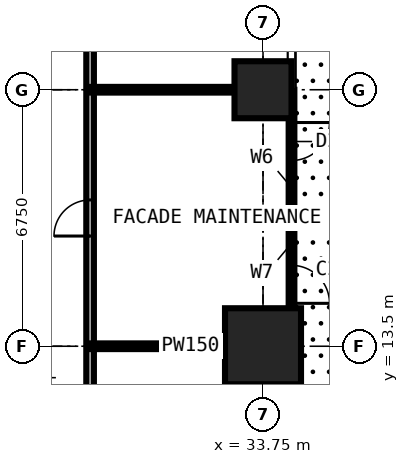
"""IFC4 building model, lengths in metres.
Left out: names, types, materials, properties, quantities, classifications, styles, units other than length and angle.
Written with IfcOpenShell. Run it as: python <this file> out.ifc"""

import sys

from ifc_helpers import new_model, si_unit, direction, frame, frame_2d, origin, origin_2d, place, context, subcontext, project, spatial, rectangle, extrude, element, fill, save


model = new_model("IFC4")
c1 = context("Model", 3, precision=1e-05, world=origin(), true_north=direction((0.0, 1.0)))
c2 = subcontext(c1, "Body", "Model", "MODEL_VIEW")
j1 = project(units=[si_unit("LENGTHUNIT", "METRE"), si_unit("PLANEANGLEUNIT", "RADIAN")], contexts=[c1])
p1 = place(None, origin())
s1 = spatial("IfcSite", under=j1, at=p1, CompositionType="ELEMENT")
p2 = place(p1, origin())
s2 = spatial("IfcBuilding", under=s1, at=p2, CompositionType="ELEMENT")
p3 = place(p2, frame((0.0, 0.0, 142.2)))
s3 = spatial("IfcBuildingStorey", under=s2, at=p3, CompositionType="ELEMENT", Elevation=142.2)
p4 = place(p3, frame((33.75, 13.5, 0.0), z_axis=(0.0, 0.0, 1.0), x_axis=(1.0, 0.0, 0.0)))
e1 = element("IfcColumn", 1, at=p4, inside=s3, PredefinedType="COLUMN", context=c2, shape_type="SweptSolid", body=[
    extrude(rectangle(XDim=2.0, YDim=2.0, at=origin_2d()), origin(), (0.0, 0.0, 1.0), 3.6),
])
p5 = place(p3, frame((33.75, 20.25, 0.0), z_axis=(0.0, 0.0, 1.0), x_axis=(1.0, 0.0, 0.0)))
e2 = element("IfcColumn", 2, at=p5, inside=s3, PredefinedType="COLUMN", context=c2, shape_type="SweptSolid", body=[
    extrude(rectangle(XDim=1.5, YDim=1.5, at=origin_2d()), origin(), (0.0, 0.0, 1.0), 3.6),
])
p6 = place(p3, frame((34.5, 20.25, 0.0), z_axis=(0.0, 0.0, 1.0), x_axis=(0.0, -1.0, 0.0)))
e3 = element("IfcWall", 3, at=p6, inside=s3, PredefinedType="SOLIDWALL", context=c2, shape_type="SweptSolid", body=[
    extrude(rectangle(XDim=6.75, YDim=0.15, at=frame_2d((3.375, 0.0))), origin(), (0.0, 0.0, 1.0), 3.375),
])
p7 = place(p6, frame((0.863, 0.0, 0.0)))
e4 = element("IfcOpeningElement", 4, at=p7, cuts=e3, PredefinedType="OPENING", context=c2, shape_type="SweptSolid", body=[
    extrude(rectangle(XDim=1.0, YDim=2.2, at=frame_2d((0.5, 1.1))), frame((0.0, 0.085, 0.0), z_axis=(0.0, -1.0, 0.0), x_axis=(1.0, 0.0, 0.0)), (0.0, 0.0, 1.0), 0.17),
])
p8 = place(p6, frame((1.975, 0.0, 0.9)))
e5 = element("IfcOpeningElement", 5, at=p8, cuts=e3, PredefinedType="OPENING", context=c2, shape_type="SweptSolid", body=[
    extrude(rectangle(XDim=1.2, YDim=1.8, at=frame_2d((0.6, 0.9))), frame((0.0, 0.085, 0.0), z_axis=(0.0, -1.0, 0.0), x_axis=(1.0, 0.0, 0.0)), (0.0, 0.0, 1.0), 0.17),
])
p9 = place(p6, frame((4.621, 0.0, 0.0)))
e6 = element("IfcOpeningElement", 6, at=p9, cuts=e3, PredefinedType="OPENING", context=c2, shape_type="SweptSolid", body=[
    extrude(rectangle(XDim=1.0, YDim=2.2, at=frame_2d((0.5, 1.1))), frame((0.0, 0.085, 0.0), z_axis=(0.0, -1.0, 0.0), x_axis=(1.0, 0.0, 0.0)), (0.0, 0.0, 1.0), 0.17),
])
p10 = place(p6, frame((3.592, 0.0, 0.9)))
e7 = element("IfcOpeningElement", 7, at=p10, cuts=e3, PredefinedType="OPENING", context=c2, shape_type="SweptSolid", body=[
    extrude(rectangle(XDim=0.9, YDim=1.8, at=frame_2d((0.45, 0.9))), frame((0.0, 0.085, 0.0), z_axis=(0.0, -1.0, 0.0), x_axis=(1.0, 0.0, 0.0)), (0.0, 0.0, 1.0), 0.17),
])
p11 = place(p3, frame((29.2, 11.3, 0.0), z_axis=(0.0, 0.0, 1.0), x_axis=(0.0, 1.0, 0.0)))
e8 = element("IfcWall", 8, at=p11, inside=s3, PredefinedType="PARTITIONING", context=c2, shape_type="SweptSolid", body=[
    extrude(rectangle(XDim=17.9, YDim=0.2, at=frame_2d((8.95, 0.0))), origin(), (0.0, 0.0, 1.0), 3.375),
])
p12 = place(p11, frame((10.55, 0.0, 0.0)))
e9 = element("IfcOpeningElement", 9, at=p12, cuts=e8, PredefinedType="OPENING", context=c2, shape_type="SweptSolid", body=[
    extrude(rectangle(XDim=0.95, YDim=2.2, at=frame_2d((0.475, 1.1))), frame((0.0, 0.11, 0.0), z_axis=(0.0, -1.0, 0.0), x_axis=(1.0, 0.0, 0.0)), (0.0, 0.0, 1.0), 0.22),
])
p13 = place(p11, frame((16.3, 0.0, 0.0)))
e10 = element("IfcOpeningElement", 10, at=p13, cuts=e8, PredefinedType="OPENING", context=c2, shape_type="SweptSolid", body=[
    extrude(rectangle(XDim=1.0, YDim=2.2, at=frame_2d((0.5, 1.1))), frame((0.0, 0.11, 0.0), z_axis=(0.0, -1.0, 0.0), x_axis=(1.0, 0.0, 0.0)), (0.0, 0.0, 1.0), 0.22),
])
p14 = place(p11, frame((5.1, 0.0, 0.0)))
e11 = element("IfcOpeningElement", 11, at=p14, cuts=e8, PredefinedType="OPENING", context=c2, shape_type="SweptSolid", body=[
    extrude(rectangle(XDim=0.95, YDim=2.2, at=frame_2d((0.475, 1.1))), frame((0.0, 0.11, 0.0), z_axis=(0.0, -1.0, 0.0), x_axis=(1.0, 0.0, 0.0)), (0.0, 0.0, 1.0), 0.22),
])
for number, where, z_axis, x_axis in (
    (12, (29.2, 13.5, 0.0), (0.0, 0.0, 1.0), (1.0, 0.0, 0.0)),
    (13, (29.2, 20.25, 0.0), (0.0, 0.0, 1.0), (1.0, 0.0, 0.0)),
):
    element("IfcWall", number, at=place(p3, frame(where, z_axis=z_axis, x_axis=x_axis)), inside=s3, PredefinedType="PARTITIONING", context=c2, shape_type="SweptSolid", body=[
        extrude(rectangle(XDim=5.284, YDim=0.15, at=frame_2d((2.642, 0.0))), origin(), (0.0, 0.0, 1.0), 2.806),
    ])
p15 = place(p7, origin())
e14 = element("IfcDoor", 14, at=p15, inside=s3, OperationType="SINGLE_SWING_LEFT", PredefinedType="DOOR", context=c2, shape_type="SweptSolid", body=[
    extrude(rectangle(XDim=1.0, YDim=2.2, at=frame_2d((0.5, 1.1))), frame((0.0, 0.025, 0.0), z_axis=(0.0, -1.0, 0.0), x_axis=(1.0, 0.0, 0.0)), (0.0, 0.0, 1.0), 0.05),
])
fill(e4, e14)
p16 = place(p8, origin())
e15 = element("IfcWindow", 15, at=p16, inside=s3, PartitioningType="SINGLE_PANEL", PredefinedType="WINDOW", context=c2, shape_type="SweptSolid", body=[
    extrude(rectangle(XDim=1.2, YDim=1.8, at=frame_2d((0.6, 0.9))), frame((0.0, 0.03, 0.0), z_axis=(0.0, -1.0, 0.0), x_axis=(1.0, 0.0, 0.0)), (0.0, 0.0, 1.0), 0.06),
])
fill(e5, e15)
p17 = place(p9, origin())
e16 = element("IfcDoor", 16, at=p17, inside=s3, OperationType="SINGLE_SWING_RIGHT", PredefinedType="DOOR", context=c2, shape_type="SweptSolid", body=[
    extrude(rectangle(XDim=1.0, YDim=2.2, at=frame_2d((0.5, 1.1))), frame((0.0, 0.025, 0.0), z_axis=(0.0, -1.0, 0.0), x_axis=(1.0, 0.0, 0.0)), (0.0, 0.0, 1.0), 0.05),
])
fill(e6, e16)
p18 = place(p10, origin())
e17 = element("IfcWindow", 17, at=p18, inside=s3, PartitioningType="SINGLE_PANEL", PredefinedType="WINDOW", context=c2, shape_type="SweptSolid", body=[
    extrude(rectangle(XDim=0.9, YDim=1.8, at=frame_2d((0.45, 0.9))), frame((0.0, 0.03, 0.0), z_axis=(0.0, -1.0, 0.0), x_axis=(1.0, 0.0, 0.0)), (0.0, 0.0, 1.0), 0.06),
])
fill(e7, e17)
p19 = place(p14, origin())
e18 = element("IfcDoor", 18, at=p19, inside=s3, OperationType="SINGLE_SWING_LEFT", PredefinedType="DOOR", context=c2, shape_type="SweptSolid", body=[
    extrude(rectangle(XDim=0.95, YDim=2.2, at=frame_2d((0.475, 1.1))), frame((0.0, 0.025, 0.0), z_axis=(0.0, -1.0, 0.0), x_axis=(1.0, 0.0, 0.0)), (0.0, 0.0, 1.0), 0.05),
])
fill(e11, e18)
save(model, sys.argv[1])
